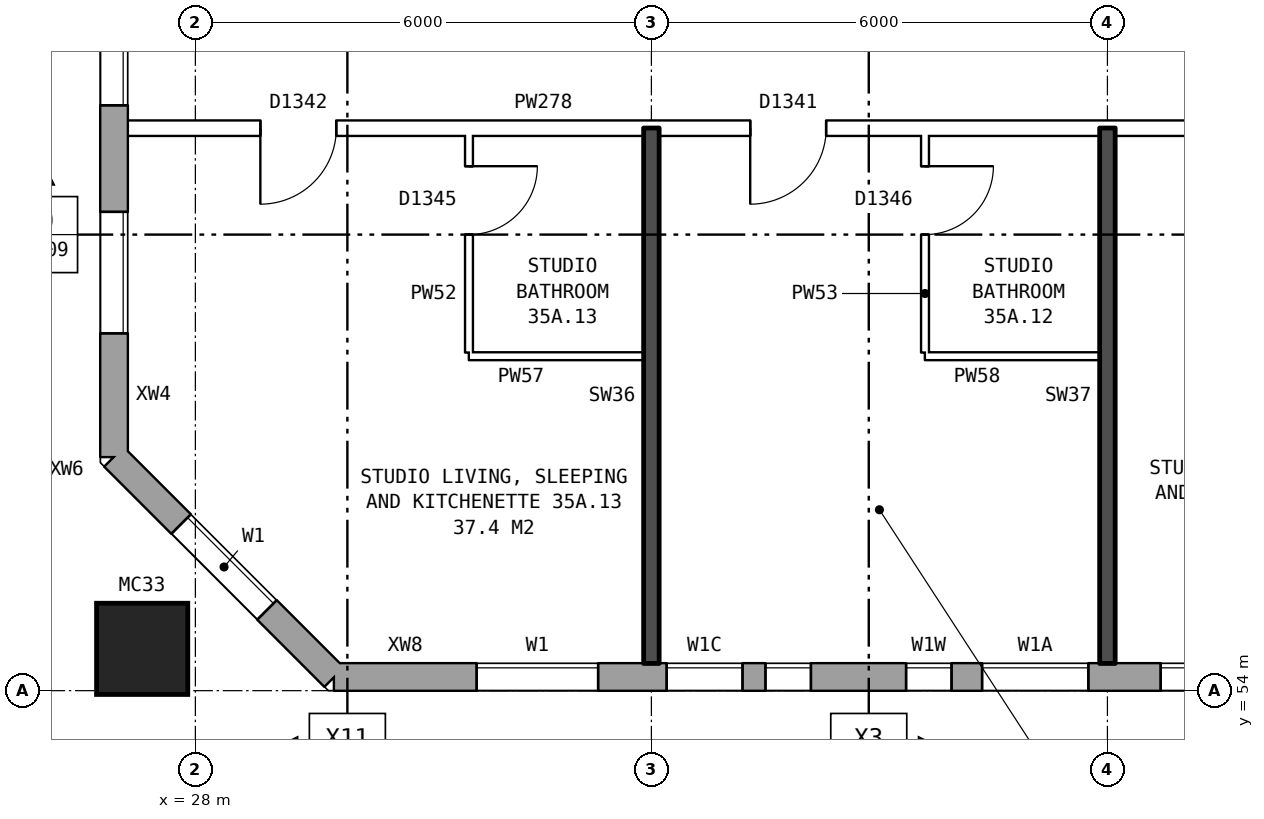
"""IFC4 building model, lengths in metres.
Left out: names, types, materials, properties, quantities, classifications, styles, units other than length and angle.
Written with IfcOpenShell. Run it as: python <this file> out.ifc"""

import sys

from ifc_helpers import new_model, si_unit, direction, frame, frame_2d, origin, origin_2d, place, context, subcontext, project, spatial, rectangle, hollow_rectangle, extrude, element, fill, save


model = new_model("IFC4")
c1 = context("Model", 3, precision=1e-05, world=origin(), true_north=direction((0.0, 1.0)))
c2 = subcontext(c1, "Body", "Model", "MODEL_VIEW")
j1 = project(units=[si_unit("LENGTHUNIT", "METRE"), si_unit("PLANEANGLEUNIT", "RADIAN")], contexts=[c1])
p1 = place(None, origin())
s1 = spatial("IfcSite", under=j1, at=p1, CompositionType="ELEMENT")
p2 = place(p1, origin())
s2 = spatial("IfcBuilding", under=s1, at=p2, CompositionType="ELEMENT")
p3 = place(p2, frame((0.0, 0.0, 126.8)))
s3 = spatial("IfcBuildingStorey", under=s2, at=p3, CompositionType="ELEMENT", Elevation=126.8)
p4 = place(p3, frame((27.3, 54.55, 0.0), z_axis=(0.0, 0.0, 1.0), x_axis=(1.0, 0.0, 0.0)))
e1 = element("IfcColumn", 1, at=p4, inside=s3, PredefinedType="COLUMN", context=c2, shape_type="SweptSolid", body=[
    extrude(hollow_rectangle(XDim=1.2, YDim=1.2, WallThickness=0.065, at=origin_2d()), origin(), (0.0, 0.0, 1.0), 3.1),
])
p5 = place(p3, frame((26.93, 57.075, 0.0), z_axis=(0.0, 0.0, 1.0), x_axis=(0.707106781187, -0.707106781187, 0.0)))
e2 = element("IfcWall", 2, at=p5, inside=s3, PredefinedType="STANDARD", context=c2, shape_type="SweptSolid", body=[
    extrude(rectangle(XDim=4.094, YDim=0.36, at=frame_2d((2.047, 0.0))), origin(), (0.0, 0.0, 1.0), 2.85),
])
p6 = place(p5, frame((1.247, 0.0, 0.8)))
e3 = element("IfcOpeningElement", 3, at=p6, cuts=e2, PredefinedType="OPENING", context=c2, shape_type="SweptSolid", body=[
    extrude(rectangle(XDim=1.6, YDim=1.8, at=frame_2d((0.8, 0.9))), frame((0.0, 0.19, 0.0), z_axis=(0.0, -1.0, 0.0), x_axis=(1.0, 0.0, 0.0)), (0.0, 0.0, 1.0), 0.38),
])
p7 = place(p3, frame((29.825, 54.18, 0.0), z_axis=(0.0, 0.0, 1.0), x_axis=(1.0, 0.0, 0.0)))
e4 = element("IfcWall", 4, at=p7, inside=s3, PredefinedType="STANDARD", context=c2, shape_type="SweptSolid", body=[
    extrude(rectangle(XDim=43.101, YDim=0.36, at=frame_2d((21.55, 0.0))), origin(), (0.0, 0.0, 1.0), 2.85),
])
p8 = place(p7, frame((1.875, 0.0, 0.8)))
e5 = element("IfcOpeningElement", 5, at=p8, cuts=e4, PredefinedType="OPENING", context=c2, shape_type="SweptSolid", body=[
    extrude(rectangle(XDim=1.6, YDim=1.8, at=frame_2d((0.8, 0.9))), frame((0.0, 0.19, 0.0), z_axis=(0.0, -1.0, 0.0), x_axis=(1.0, 0.0, 0.0)), (0.0, 0.0, 1.0), 0.38),
])
p9 = place(p7, frame((4.375, 0.0, 0.8)))
e6 = element("IfcOpeningElement", 6, at=p9, cuts=e4, PredefinedType="OPENING", context=c2, shape_type="SweptSolid", body=[
    extrude(rectangle(XDim=1.0, YDim=1.8, at=frame_2d((0.5, 0.9))), frame((0.0, 0.19, 0.0), z_axis=(0.0, -1.0, 0.0), x_axis=(1.0, 0.0, 0.0)), (0.0, 0.0, 1.0), 0.38),
])
p10 = place(p7, frame((5.675, 0.0, 1.6)))
e7 = element("IfcOpeningElement", 7, at=p10, cuts=e4, PredefinedType="OPENING", context=c2, shape_type="SweptSolid", body=[
    extrude(rectangle(XDim=0.6, YDim=0.9, at=frame_2d((0.3, 0.45))), frame((0.0, 0.19, 0.0), z_axis=(0.0, -1.0, 0.0), x_axis=(1.0, 0.0, 0.0)), (0.0, 0.0, 1.0), 0.38),
])
p11 = place(p7, frame((10.875, 0.0, 0.8)))
e8 = element("IfcOpeningElement", 8, at=p11, cuts=e4, PredefinedType="OPENING", context=c2, shape_type="SweptSolid", body=[
    extrude(rectangle(XDim=1.6, YDim=1.8, at=frame_2d((0.8, 0.9))), frame((0.0, 0.19, 0.0), z_axis=(0.0, -1.0, 0.0), x_axis=(1.0, 0.0, 0.0)), (0.0, 0.0, 1.0), 0.38),
])
p12 = place(p7, frame((13.875, 0.0, 0.8)))
e9 = element("IfcOpeningElement", 9, at=p12, cuts=e4, PredefinedType="OPENING", context=c2, shape_type="SweptSolid", body=[
    extrude(rectangle(XDim=1.6, YDim=1.8, at=frame_2d((0.8, 0.9))), frame((0.0, 0.19, 0.0), z_axis=(0.0, -1.0, 0.0), x_axis=(1.0, 0.0, 0.0)), (0.0, 0.0, 1.0), 0.38),
])
p13 = place(p7, frame((16.875, 0.0, 0.8)))
e10 = element("IfcOpeningElement", 10, at=p13, cuts=e4, PredefinedType="OPENING", context=c2, shape_type="SweptSolid", body=[
    extrude(rectangle(XDim=1.6, YDim=1.8, at=frame_2d((0.8, 0.9))), frame((0.0, 0.19, 0.0), z_axis=(0.0, -1.0, 0.0), x_axis=(1.0, 0.0, 0.0)), (0.0, 0.0, 1.0), 0.38),
])
p14 = place(p7, frame((19.875, 0.0, 0.8)))
e11 = element("IfcOpeningElement", 11, at=p14, cuts=e4, PredefinedType="OPENING", context=c2, shape_type="SweptSolid", body=[
    extrude(rectangle(XDim=1.6, YDim=1.8, at=frame_2d((0.8, 0.9))), frame((0.0, 0.19, 0.0), z_axis=(0.0, -1.0, 0.0), x_axis=(1.0, 0.0, 0.0)), (0.0, 0.0, 1.0), 0.38),
])
p15 = place(p7, frame((22.875, 0.0, 0.8)))
e12 = element("IfcOpeningElement", 12, at=p15, cuts=e4, PredefinedType="OPENING", context=c2, shape_type="SweptSolid", body=[
    extrude(rectangle(XDim=1.6, YDim=1.8, at=frame_2d((0.8, 0.9))), frame((0.0, 0.19, 0.0), z_axis=(0.0, -1.0, 0.0), x_axis=(1.0, 0.0, 0.0)), (0.0, 0.0, 1.0), 0.38),
])
p16 = place(p7, frame((25.875, 0.0, 0.8)))
e13 = element("IfcOpeningElement", 13, at=p16, cuts=e4, PredefinedType="OPENING", context=c2, shape_type="SweptSolid", body=[
    extrude(rectangle(XDim=1.6, YDim=1.8, at=frame_2d((0.8, 0.9))), frame((0.0, 0.19, 0.0), z_axis=(0.0, -1.0, 0.0), x_axis=(1.0, 0.0, 0.0)), (0.0, 0.0, 1.0), 0.38),
])
p17 = place(p7, frame((28.875, 0.0, 0.8)))
e14 = element("IfcOpeningElement", 14, at=p17, cuts=e4, PredefinedType="OPENING", context=c2, shape_type="SweptSolid", body=[
    extrude(rectangle(XDim=1.6, YDim=1.8, at=frame_2d((0.8, 0.9))), frame((0.0, 0.19, 0.0), z_axis=(0.0, -1.0, 0.0), x_axis=(1.0, 0.0, 0.0)), (0.0, 0.0, 1.0), 0.38),
])
p18 = place(p7, frame((31.875, 0.0, 0.8)))
e15 = element("IfcOpeningElement", 15, at=p18, cuts=e4, PredefinedType="OPENING", context=c2, shape_type="SweptSolid", body=[
    extrude(rectangle(XDim=1.6, YDim=1.8, at=frame_2d((0.8, 0.9))), frame((0.0, 0.19, 0.0), z_axis=(0.0, -1.0, 0.0), x_axis=(1.0, 0.0, 0.0)), (0.0, 0.0, 1.0), 0.38),
])
p19 = place(p7, frame((34.375, 0.0, 0.8)))
e16 = element("IfcOpeningElement", 16, at=p19, cuts=e4, PredefinedType="OPENING", context=c2, shape_type="SweptSolid", body=[
    extrude(rectangle(XDim=1.2, YDim=0.9, at=frame_2d((0.6, 0.45))), frame((0.0, 0.19, 0.0), z_axis=(0.0, -1.0, 0.0), x_axis=(1.0, 0.0, 0.0)), (0.0, 0.0, 1.0), 0.38),
])
p20 = place(p7, frame((37.875, 0.0, 0.8)))
e17 = element("IfcOpeningElement", 17, at=p20, cuts=e4, PredefinedType="OPENING", context=c2, shape_type="SweptSolid", body=[
    extrude(rectangle(XDim=1.6, YDim=1.8, at=frame_2d((0.8, 0.9))), frame((0.0, 0.19, 0.0), z_axis=(0.0, -1.0, 0.0), x_axis=(1.0, 0.0, 0.0)), (0.0, 0.0, 1.0), 0.38),
])
p21 = place(p7, frame((40.875, 0.0, 0.8)))
e18 = element("IfcOpeningElement", 18, at=p21, cuts=e4, PredefinedType="OPENING", context=c2, shape_type="SweptSolid", body=[
    extrude(rectangle(XDim=1.6, YDim=1.8, at=frame_2d((0.8, 0.9))), frame((0.0, 0.19, 0.0), z_axis=(0.0, -1.0, 0.0), x_axis=(1.0, 0.0, 0.0)), (0.0, 0.0, 1.0), 0.38),
])
p22 = place(p7, frame((7.525, 0.0, 0.8)))
e19 = element("IfcOpeningElement", 19, at=p22, cuts=e4, PredefinedType="OPENING", context=c2, shape_type="SweptSolid", body=[
    extrude(rectangle(XDim=0.6, YDim=0.9, at=frame_2d((0.3, 0.45))), frame((0.0, 0.19, 0.0), z_axis=(0.0, -1.0, 0.0), x_axis=(1.0, 0.0, 0.0)), (0.0, 0.0, 1.0), 0.38),
])
p23 = place(p7, frame((8.525, 0.0, 0.8)))
e20 = element("IfcOpeningElement", 20, at=p23, cuts=e4, PredefinedType="OPENING", context=c2, shape_type="SweptSolid", body=[
    extrude(rectangle(XDim=1.4, YDim=1.8, at=frame_2d((0.7, 0.9))), frame((0.0, 0.19, 0.0), z_axis=(0.0, -1.0, 0.0), x_axis=(1.0, 0.0, 0.0)), (0.0, 0.0, 1.0), 0.38),
])
p24 = place(p7, frame((36.725, 0.0, 1.7)))
e21 = element("IfcOpeningElement", 21, at=p24, cuts=e4, PredefinedType="OPENING", context=c2, shape_type="SweptSolid", body=[
    extrude(rectangle(XDim=0.8, YDim=0.9, at=frame_2d((0.4, 0.45))), frame((0.0, 0.19, 0.0), z_axis=(0.0, -1.0, 0.0), x_axis=(1.0, 0.0, 0.0)), (0.0, 0.0, 1.0), 0.38),
])
p25 = place(p3, frame((26.93, 82.925, 0.0), z_axis=(0.0, 0.0, 1.0), x_axis=(0.0, -1.0, 0.0)))
e22 = element("IfcWall", 22, at=p25, inside=s3, PredefinedType="STANDARD", context=c2, shape_type="SweptSolid", body=[
    extrude(rectangle(XDim=25.851, YDim=0.36, at=frame_2d((12.925, 0.0))), origin(), (0.0, 0.0, 1.0), 2.85),
])
p26 = place(p25, frame((1.625, 0.0, 0.8)))
e23 = element("IfcOpeningElement", 23, at=p26, cuts=e22, PredefinedType="OPENING", context=c2, shape_type="SweptSolid", body=[
    extrude(rectangle(XDim=1.6, YDim=1.8, at=frame_2d((0.8, 0.9))), frame((0.0, 0.19, 0.0), z_axis=(0.0, -1.0, 0.0), x_axis=(1.0, 0.0, 0.0)), (0.0, 0.0, 1.0), 0.38),
])
p27 = place(p25, frame((4.625, 0.0, 0.8)))
e24 = element("IfcOpeningElement", 24, at=p27, cuts=e22, PredefinedType="OPENING", context=c2, shape_type="SweptSolid", body=[
    extrude(rectangle(XDim=1.6, YDim=1.8, at=frame_2d((0.8, 0.9))), frame((0.0, 0.19, 0.0), z_axis=(0.0, -1.0, 0.0), x_axis=(1.0, 0.0, 0.0)), (0.0, 0.0, 1.0), 0.38),
])
p28 = place(p25, frame((6.525, 0.0, 0.8)))
e25 = element("IfcOpeningElement", 25, at=p28, cuts=e22, PredefinedType="OPENING", context=c2, shape_type="SweptSolid", body=[
    extrude(rectangle(XDim=1.2, YDim=1.8, at=frame_2d((0.6, 0.9))), frame((0.0, 0.19, 0.0), z_axis=(0.0, -1.0, 0.0), x_axis=(1.0, 0.0, 0.0)), (0.0, 0.0, 1.0), 0.38),
])
p29 = place(p25, frame((8.025, 0.0, 1.6)))
e26 = element("IfcOpeningElement", 26, at=p29, cuts=e22, PredefinedType="OPENING", context=c2, shape_type="SweptSolid", body=[
    extrude(rectangle(XDim=1.0, YDim=0.9, at=frame_2d((0.5, 0.45))), frame((0.0, 0.19, 0.0), z_axis=(0.0, -1.0, 0.0), x_axis=(1.0, 0.0, 0.0)), (0.0, 0.0, 1.0), 0.38),
])
p30 = place(p25, frame((10.075, 0.0, 0.8)))
e27 = element("IfcOpeningElement", 27, at=p30, cuts=e22, PredefinedType="OPENING", context=c2, shape_type="SweptSolid", body=[
    extrude(rectangle(XDim=1.0, YDim=0.9, at=frame_2d((0.5, 0.45))), frame((0.0, 0.19, 0.0), z_axis=(0.0, -1.0, 0.0), x_axis=(1.0, 0.0, 0.0)), (0.0, 0.0, 1.0), 0.38),
])
p31 = place(p25, frame((11.375, 0.0, 0.8)))
e28 = element("IfcOpeningElement", 28, at=p31, cuts=e22, PredefinedType="OPENING", context=c2, shape_type="SweptSolid", body=[
    extrude(rectangle(XDim=1.2, YDim=1.8, at=frame_2d((0.6, 0.9))), frame((0.0, 0.19, 0.0), z_axis=(0.0, -1.0, 0.0), x_axis=(1.0, 0.0, 0.0)), (0.0, 0.0, 1.0), 0.38),
])
p32 = place(p25, frame((19.625, 0.0, 0.8)))
e29 = element("IfcOpeningElement", 29, at=p32, cuts=e22, PredefinedType="OPENING", context=c2, shape_type="SweptSolid", body=[
    extrude(rectangle(XDim=1.6, YDim=1.8, at=frame_2d((0.8, 0.9))), frame((0.0, 0.19, 0.0), z_axis=(0.0, -1.0, 0.0), x_axis=(1.0, 0.0, 0.0)), (0.0, 0.0, 1.0), 0.38),
])
p33 = place(p25, frame((22.625, 0.0, 0.8)))
e30 = element("IfcOpeningElement", 30, at=p33, cuts=e22, PredefinedType="OPENING", context=c2, shape_type="SweptSolid", body=[
    extrude(rectangle(XDim=1.6, YDim=1.8, at=frame_2d((0.8, 0.9))), frame((0.0, 0.19, 0.0), z_axis=(0.0, -1.0, 0.0), x_axis=(1.0, 0.0, 0.0)), (0.0, 0.0, 1.0), 0.38),
])
p34 = place(p25, frame((12.875, 0.0, 0.8)))
e31 = element("IfcOpeningElement", 31, at=p34, cuts=e22, PredefinedType="OPENING", context=c2, shape_type="SweptSolid", body=[
    extrude(rectangle(XDim=1.6, YDim=1.8, at=frame_2d((0.8, 0.9))), frame((0.0, 0.19, 0.0), z_axis=(0.0, -1.0, 0.0), x_axis=(1.0, 0.0, 0.0)), (0.0, 0.0, 1.0), 0.38),
])
p35 = place(p25, frame((14.775, 0.0, 0.8)))
e32 = element("IfcOpeningElement", 32, at=p35, cuts=e22, PredefinedType="OPENING", context=c2, shape_type="SweptSolid", body=[
    extrude(rectangle(XDim=1.0, YDim=0.9, at=frame_2d((0.5, 0.45))), frame((0.0, 0.19, 0.0), z_axis=(0.0, -1.0, 0.0), x_axis=(1.0, 0.0, 0.0)), (0.0, 0.0, 1.0), 0.38),
])
p36 = place(p25, frame((16.675, 0.0, 1.7)))
e33 = element("IfcOpeningElement", 33, at=p36, cuts=e22, PredefinedType="OPENING", context=c2, shape_type="SweptSolid", body=[
    extrude(rectangle(XDim=1.0, YDim=0.9, at=frame_2d((0.5, 0.45))), frame((0.0, 0.19, 0.0), z_axis=(0.0, -1.0, 0.0), x_axis=(1.0, 0.0, 0.0)), (0.0, 0.0, 1.0), 0.38),
])
p37 = place(p25, frame((17.975, 0.0, 0.8)))
e34 = element("IfcOpeningElement", 34, at=p37, cuts=e22, PredefinedType="OPENING", context=c2, shape_type="SweptSolid", body=[
    extrude(rectangle(XDim=1.2, YDim=1.8, at=frame_2d((0.6, 0.9))), frame((0.0, 0.19, 0.0), z_axis=(0.0, -1.0, 0.0), x_axis=(1.0, 0.0, 0.0)), (0.0, 0.0, 1.0), 0.38),
])
for number, where, z_axis, x_axis in (
    (35, (31.6, 58.4, 0.0), (0.0, 0.0, 1.0), (1.0, 0.0, 0.0)),
    (36, (37.6, 58.4, 0.0), (0.0, 0.0, 1.0), (1.0, 0.0, 0.0)),
):
    element("IfcWall", number, at=place(p3, frame(where, z_axis=z_axis, x_axis=x_axis)), inside=s3, PredefinedType="PARTITIONING", context=c2, shape_type="SweptSolid", body=[
        extrude(rectangle(XDim=2.3, YDim=0.1, at=frame_2d((1.15, 0.0))), origin(), (0.0, 0.0, 1.0), 2.85),
    ])
p38 = place(p3, frame((27.11, 61.4, 0.0), z_axis=(0.0, 0.0, 1.0), x_axis=(1.0, 0.0, 0.0)))
e37 = element("IfcWall", 37, at=p38, inside=s3, PredefinedType="PARTITIONING", context=c2, shape_type="SweptSolid", body=[
    extrude(rectangle(XDim=18.79, YDim=0.2, at=frame_2d((9.395, 0.0))), origin(), (0.0, 0.0, 1.0), 2.85),
])
p39 = place(p38, frame((14.19, 0.0, 0.0)))
e38 = element("IfcOpeningElement", 38, at=p39, cuts=e37, PredefinedType="OPENING", context=c2, shape_type="SweptSolid", body=[
    extrude(rectangle(XDim=1.0, YDim=2.1, at=frame_2d((0.5, 1.05))), frame((0.0, 0.11, 0.0), z_axis=(0.0, -1.0, 0.0), x_axis=(1.0, 0.0, 0.0)), (0.0, 0.0, 1.0), 0.22),
])
p40 = place(p38, frame((8.19, 0.0, 0.0)))
e39 = element("IfcOpeningElement", 39, at=p40, cuts=e37, PredefinedType="OPENING", context=c2, shape_type="SweptSolid", body=[
    extrude(rectangle(XDim=1.0, YDim=2.1, at=frame_2d((0.5, 1.05))), frame((0.0, 0.11, 0.0), z_axis=(0.0, -1.0, 0.0), x_axis=(1.0, 0.0, 0.0)), (0.0, 0.0, 1.0), 0.22),
])
p41 = place(p38, frame((1.745, 0.0, 0.0)))
e40 = element("IfcOpeningElement", 40, at=p41, cuts=e37, PredefinedType="OPENING", context=c2, shape_type="SweptSolid", body=[
    extrude(rectangle(XDim=1.0, YDim=2.1, at=frame_2d((0.5, 1.05))), frame((0.0, 0.11, 0.0), z_axis=(0.0, -1.0, 0.0), x_axis=(1.0, 0.0, 0.0)), (0.0, 0.0, 1.0), 0.22),
])
p42 = place(p3, frame((31.6, 58.45, 0.0), z_axis=(0.0, 0.0, 1.0), x_axis=(0.0, 1.0, 0.0)))
e41 = element("IfcWall", 41, at=p42, inside=s3, PredefinedType="PARTITIONING", context=c2, shape_type="SweptSolid", body=[
    extrude(rectangle(XDim=2.85, YDim=0.1, at=frame_2d((1.425, 0.0))), origin(), (0.0, 0.0, 1.0), 2.85),
])
p43 = place(p42, frame((1.55, 0.0, 0.0)))
e42 = element("IfcOpeningElement", 42, at=p43, cuts=e41, PredefinedType="OPENING", context=c2, shape_type="SweptSolid", body=[
    extrude(rectangle(XDim=0.9, YDim=2.1, at=frame_2d((0.45, 1.05))), frame((0.0, 0.06, 0.0), z_axis=(0.0, -1.0, 0.0), x_axis=(1.0, 0.0, 0.0)), (0.0, 0.0, 1.0), 0.12),
])
p44 = place(p3, frame((34.0, 54.36, 0.0), z_axis=(0.0, 0.0, 1.0), x_axis=(0.0, 1.0, 0.0)))
e43 = element("IfcWall", 43, at=p44, inside=s3, PredefinedType="SOLIDWALL", context=c2, shape_type="SweptSolid", body=[
    extrude(rectangle(XDim=7.04, YDim=0.2, at=frame_2d((3.52, 0.0))), origin(), (0.0, 0.0, 1.0), 2.85),
])
p45 = place(p3, frame((37.6, 58.45, 0.0), z_axis=(0.0, 0.0, 1.0), x_axis=(0.0, 1.0, 0.0)))
e44 = element("IfcWall", 44, at=p45, inside=s3, PredefinedType="PARTITIONING", context=c2, shape_type="SweptSolid", body=[
    extrude(rectangle(XDim=2.85, YDim=0.1, at=frame_2d((1.425, 0.0))), origin(), (0.0, 0.0, 1.0), 2.85),
])
p46 = place(p45, frame((1.55, 0.0, 0.0)))
e45 = element("IfcOpeningElement", 45, at=p46, cuts=e44, PredefinedType="OPENING", context=c2, shape_type="SweptSolid", body=[
    extrude(rectangle(XDim=0.9, YDim=2.1, at=frame_2d((0.45, 1.05))), frame((0.0, 0.06, 0.0), z_axis=(0.0, -1.0, 0.0), x_axis=(1.0, 0.0, 0.0)), (0.0, 0.0, 1.0), 0.12),
])
p47 = place(p3, frame((40.0, 54.36, 0.0), z_axis=(0.0, 0.0, 1.0), x_axis=(0.0, 1.0, 0.0)))
e46 = element("IfcWall", 46, at=p47, inside=s3, PredefinedType="SOLIDWALL", context=c2, shape_type="SweptSolid", body=[
    extrude(rectangle(XDim=7.04, YDim=0.2, at=frame_2d((3.52, 0.0))), origin(), (0.0, 0.0, 1.0), 2.85),
])
p48 = place(p6, origin())
e47 = element("IfcWindow", 47, at=p48, inside=s3, PartitioningType="SINGLE_PANEL", PredefinedType="WINDOW", context=c2, shape_type="SweptSolid", body=[
    extrude(rectangle(XDim=1.6, YDim=1.8, at=frame_2d((0.8, 0.9))), frame((0.0, 0.15, 0.0), z_axis=(0.0, -1.0, 0.0), x_axis=(1.0, 0.0, 0.0)), (0.0, 0.0, 1.0), 0.06),
])
fill(e3, e47)
p49 = place(p8, origin())
e48 = element("IfcWindow", 48, at=p49, inside=s3, PartitioningType="SINGLE_PANEL", PredefinedType="WINDOW", context=c2, shape_type="SweptSolid", body=[
    extrude(rectangle(XDim=1.6, YDim=1.8, at=frame_2d((0.8, 0.9))), frame((0.0, 0.15, 0.0), z_axis=(0.0, -1.0, 0.0), x_axis=(1.0, 0.0, 0.0)), (0.0, 0.0, 1.0), 0.06),
])
fill(e5, e48)
p50 = place(p9, origin())
e49 = element("IfcWindow", 49, at=p50, inside=s3, PartitioningType="SINGLE_PANEL", PredefinedType="WINDOW", context=c2, shape_type="SweptSolid", body=[
    extrude(rectangle(XDim=1.0, YDim=1.8, at=frame_2d((0.5, 0.9))), frame((0.0, 0.15, 0.0), z_axis=(0.0, -1.0, 0.0), x_axis=(1.0, 0.0, 0.0)), (0.0, 0.0, 1.0), 0.06),
])
fill(e6, e49)
p51 = place(p10, origin())
e50 = element("IfcWindow", 50, at=p51, inside=s3, PartitioningType="SINGLE_PANEL", PredefinedType="WINDOW", context=c2, shape_type="SweptSolid", body=[
    extrude(rectangle(XDim=0.6, YDim=0.9, at=frame_2d((0.3, 0.45))), frame((0.0, 0.15, 0.0), z_axis=(0.0, -1.0, 0.0), x_axis=(1.0, 0.0, 0.0)), (0.0, 0.0, 1.0), 0.06),
])
fill(e7, e50)
p52 = place(p11, origin())
e51 = element("IfcWindow", 51, at=p52, inside=s3, PartitioningType="SINGLE_PANEL", PredefinedType="WINDOW", context=c2, shape_type="SweptSolid", body=[
    extrude(rectangle(XDim=1.6, YDim=1.8, at=frame_2d((0.8, 0.9))), frame((0.0, 0.15, 0.0), z_axis=(0.0, -1.0, 0.0), x_axis=(1.0, 0.0, 0.0)), (0.0, 0.0, 1.0), 0.06),
])
fill(e8, e51)
p53 = place(p32, origin())
e52 = element("IfcWindow", 52, at=p53, inside=s3, PartitioningType="SINGLE_PANEL", PredefinedType="WINDOW", context=c2, shape_type="SweptSolid", body=[
    extrude(rectangle(XDim=1.6, YDim=1.8, at=frame_2d((0.8, 0.9))), frame((0.0, 0.15, 0.0), z_axis=(0.0, -1.0, 0.0), x_axis=(1.0, 0.0, 0.0)), (0.0, 0.0, 1.0), 0.06),
])
fill(e29, e52)
p54 = place(p33, origin())
e53 = element("IfcWindow", 53, at=p54, inside=s3, PartitioningType="SINGLE_PANEL", PredefinedType="WINDOW", context=c2, shape_type="SweptSolid", body=[
    extrude(rectangle(XDim=1.6, YDim=1.8, at=frame_2d((0.8, 0.9))), frame((0.0, 0.15, 0.0), z_axis=(0.0, -1.0, 0.0), x_axis=(1.0, 0.0, 0.0)), (0.0, 0.0, 1.0), 0.06),
])
fill(e30, e53)
p55 = place(p40, frame((1.0, 0.0, 0.0), z_axis=(0.0, 0.0, 1.0), x_axis=(-1.0, 0.0, 0.0)))
e54 = element("IfcDoor", 54, at=p55, inside=s3, OperationType="SINGLE_SWING_RIGHT", PredefinedType="DOOR", context=c2, shape_type="SweptSolid", body=[
    extrude(rectangle(XDim=1.0, YDim=2.1, at=frame_2d((0.5, 1.05))), frame((0.0, 0.025, 0.0), z_axis=(0.0, -1.0, 0.0), x_axis=(1.0, 0.0, 0.0)), (0.0, 0.0, 1.0), 0.05),
])
fill(e39, e54)
p56 = place(p46, frame((0.9, 0.0, 0.0), z_axis=(0.0, 0.0, 1.0), x_axis=(-1.0, 0.0, 0.0)))
e55 = element("IfcDoor", 55, at=p56, inside=s3, OperationType="SINGLE_SWING_LEFT", PredefinedType="DOOR", context=c2, shape_type="SweptSolid", body=[
    extrude(rectangle(XDim=0.9, YDim=2.1, at=frame_2d((0.45, 1.05))), frame((0.0, 0.025, 0.0), z_axis=(0.0, -1.0, 0.0), x_axis=(1.0, 0.0, 0.0)), (0.0, 0.0, 1.0), 0.05),
])
fill(e45, e55)
p57 = place(p41, frame((1.0, 0.0, 0.0), z_axis=(0.0, 0.0, 1.0), x_axis=(-1.0, 0.0, 0.0)))
e56 = element("IfcDoor", 56, at=p57, inside=s3, OperationType="SINGLE_SWING_RIGHT", PredefinedType="DOOR", context=c2, shape_type="SweptSolid", body=[
    extrude(rectangle(XDim=1.0, YDim=2.1, at=frame_2d((0.5, 1.05))), frame((0.0, 0.025, 0.0), z_axis=(0.0, -1.0, 0.0), x_axis=(1.0, 0.0, 0.0)), (0.0, 0.0, 1.0), 0.05),
])
fill(e40, e56)
p58 = place(p43, frame((0.9, 0.0, 0.0), z_axis=(0.0, 0.0, 1.0), x_axis=(-1.0, 0.0, 0.0)))
e57 = element("IfcDoor", 57, at=p58, inside=s3, OperationType="SINGLE_SWING_LEFT", PredefinedType="DOOR", context=c2, shape_type="SweptSolid", body=[
    extrude(rectangle(XDim=0.9, YDim=2.1, at=frame_2d((0.45, 1.05))), frame((0.0, 0.025, 0.0), z_axis=(0.0, -1.0, 0.0), x_axis=(1.0, 0.0, 0.0)), (0.0, 0.0, 1.0), 0.05),
])
fill(e42, e57)
p59 = place(p22, origin())
e58 = element("IfcWindow", 58, at=p59, inside=s3, PartitioningType="SINGLE_PANEL", PredefinedType="WINDOW", context=c2, shape_type="SweptSolid", body=[
    extrude(rectangle(XDim=0.6, YDim=0.9, at=frame_2d((0.3, 0.45))), frame((0.0, 0.15, 0.0), z_axis=(0.0, -1.0, 0.0), x_axis=(1.0, 0.0, 0.0)), (0.0, 0.0, 1.0), 0.06),
])
fill(e19, e58)
p60 = place(p23, origin())
e59 = element("IfcWindow", 59, at=p60, inside=s3, PartitioningType="SINGLE_PANEL", PredefinedType="WINDOW", context=c2, shape_type="SweptSolid", body=[
    extrude(rectangle(XDim=1.4, YDim=1.8, at=frame_2d((0.7, 0.9))), frame((0.0, 0.15, 0.0), z_axis=(0.0, -1.0, 0.0), x_axis=(1.0, 0.0, 0.0)), (0.0, 0.0, 1.0), 0.06),
])
fill(e20, e59)
save(model, sys.argv[1])
